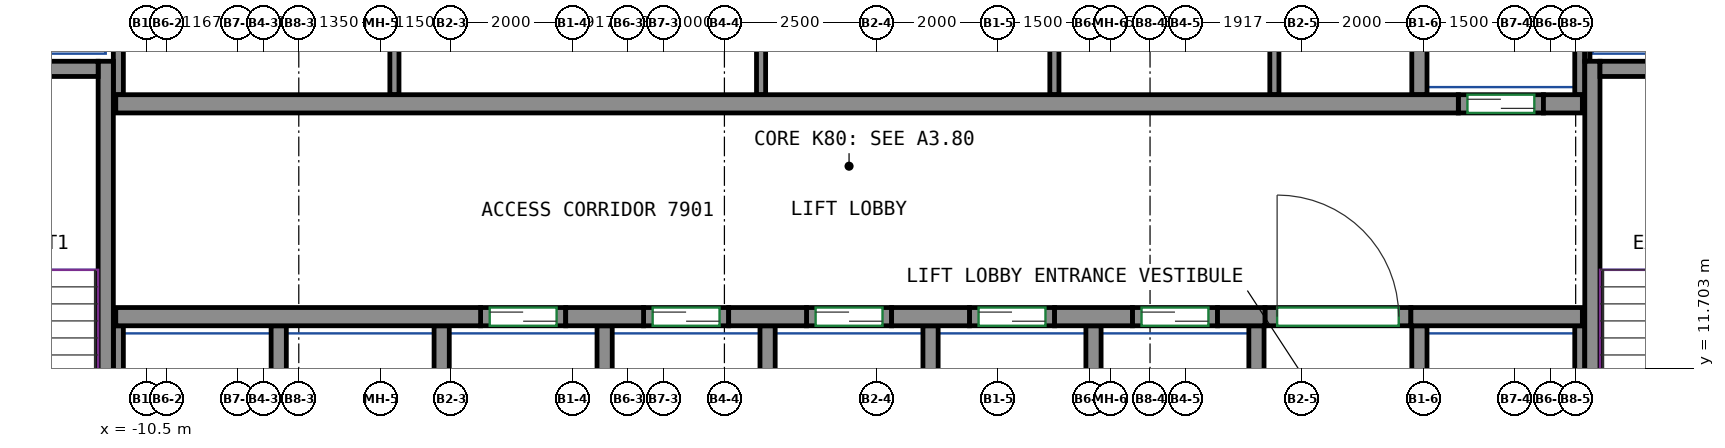
"""IFC4 building model, lengths in metres.
Left out: names, types, materials, properties, quantities, classifications, styles, units other than length and angle.
Written with IfcOpenShell. Run it as: python <this file> out.ifc"""

import sys

from ifc_helpers import new_model, si_unit, direction, frame, frame_2d, origin, place, context, subcontext, project, spatial, rectangle, extrude, source, transform, mapped, element, fill, save


model = new_model("IFC4")
c1 = context("Model", 3, precision=1e-05, world=origin(), true_north=direction((0.0, 1.0)))
c2 = subcontext(c1, "Body", "Model", "MODEL_VIEW")
j1 = project(units=[si_unit("LENGTHUNIT", "METRE"), si_unit("PLANEANGLEUNIT", "RADIAN")], contexts=[c1])
p1 = place(None, origin())
s1 = spatial("IfcSite", under=j1, at=p1, CompositionType="ELEMENT")
p2 = place(p1, origin())
s2 = spatial("IfcBuilding", under=s1, at=p2, CompositionType="ELEMENT")
p3 = place(p2, frame((0.0, 0.0, 315.4)))
s3 = spatial("IfcBuildingStorey", under=s2, at=p3, CompositionType="ELEMENT", Elevation=315.4)
m1 = source(origin(), c2, "Body", "SweptSolid", [
    extrude(rectangle(XDim=7.75, YDim=0.25, at=frame_2d((3.875, 0.0))), origin(), (0.0, 0.0, 1.0), 3.0),
])
p4 = place(p3, frame((-11.175, 9.0, 0.0), z_axis=(0.0, 0.0, 1.0), x_axis=(0.0, 1.0, 0.0)))
e1 = element("IfcWall", 1, at=p4, inside=s3, PredefinedType="SHEAR", context=c2, shape_type="MappedRepresentation", body=[
    mapped(m1, transform((0.0, 0.0, 0.0))),
])
m2 = source(origin(), c2, "Body", "SweptSolid", [
    extrude(rectangle(XDim=3.7, YDim=0.25, at=frame_2d((1.85, 0.0))), origin(), (0.0, 0.0, 1.0), 3.0),
])
p5 = place(p3, frame((-15.0, 16.625, 0.0), z_axis=(0.0, 0.0, 1.0), x_axis=(1.0, 0.0, 0.0)))
e2 = element("IfcWall", 2, at=p5, inside=s3, PredefinedType="SHEAR", context=c2, shape_type="MappedRepresentation", body=[
    mapped(m2, transform((0.0, 0.0, 0.0))),
])
p6 = place(p3, frame((13.275, 9.0, 0.0), z_axis=(0.0, 0.0, 1.0), x_axis=(0.0, 1.0, 0.0)))
e3 = element("IfcWall", 3, at=p6, inside=s3, PredefinedType="SHEAR", context=c2, shape_type="MappedRepresentation", body=[
    mapped(m1, transform((0.0, 0.0, 0.0))),
])
m3 = source(origin(), c2, "Body", "SweptSolid", [
    extrude(rectangle(XDim=3.7, YDim=0.25, at=frame_2d((1.85, 0.0))), origin(), (0.0, 0.0, 1.0), 3.0),
])
p7 = place(p3, frame((13.4, 16.625, 0.0), z_axis=(0.0, 0.0, 1.0), x_axis=(1.0, 0.0, 0.0)))
e4 = element("IfcWall", 4, at=p7, inside=s3, PredefinedType="SHEAR", context=c2, shape_type="MappedRepresentation", body=[
    mapped(m3, transform((0.0, 0.0, 0.0))),
])
m4 = source(origin(), c2, "Body", "SweptSolid", [
    extrude(rectangle(XDim=6.0, YDim=0.3, at=frame_2d((3.0, 0.0))), origin(), (0.0, 0.0, 1.0), 3.0),
])
p8 = place(p3, frame((-11.01, 12.55, 0.0), z_axis=(0.0, 0.0, 1.0), x_axis=(1.0, 0.0, 0.0)))
e5 = element("IfcWall", 5, at=p8, inside=s3, PredefinedType="SHEAR", context=c2, shape_type="MappedRepresentation", body=[
    mapped(m4, transform((0.0, 0.0, 0.0))),
])
m5 = source(origin(), c2, "Body", "SweptSolid", [
    extrude(rectangle(XDim=1.28, YDim=0.3, at=frame_2d((0.64, 0.0))), origin(), (0.0, 0.0, 1.0), 3.0),
])
for number, where, z_axis, x_axis in (
    (6, (-3.61, 12.55, 0.0), (0.0, 0.0, 1.0), (1.0, 0.0, 0.0)),
    (7, (-0.93, 12.55, 0.0), (0.0, 0.0, 1.0), (1.0, 0.0, 0.0)),
    (8, (1.75, 12.55, 0.0), (0.0, 0.0, 1.0), (1.0, 0.0, 0.0)),
    (9, (4.43, 12.55, 0.0), (0.0, 0.0, 1.0), (1.0, 0.0, 0.0)),
):
    element("IfcWall", number, at=place(p3, frame(where, z_axis=z_axis, x_axis=x_axis)), inside=s3, PredefinedType="SHEAR", context=c2, shape_type="MappedRepresentation", body=[
        mapped(m5, transform((0.0, 0.0, 0.0))),
    ])
m6 = source(origin(), c2, "Body", "SweptSolid", [
    extrude(rectangle(XDim=0.78, YDim=0.3, at=frame_2d((0.39, 0.0))), origin(), (0.0, 0.0, 1.0), 3.0),
])
p9 = place(p3, frame((7.11, 12.55, 0.0), z_axis=(0.0, 0.0, 1.0), x_axis=(1.0, 0.0, 0.0)))
e10 = element("IfcWall", 10, at=p9, inside=s3, PredefinedType="SHEAR", context=c2, shape_type="MappedRepresentation", body=[
    mapped(m6, transform((0.0, 0.0, 0.0))),
])
m7 = source(origin(), c2, "Body", "SweptSolid", [
    extrude(rectangle(XDim=2.82, YDim=0.3, at=frame_2d((1.41, 0.0))), origin(), (0.0, 0.0, 1.0), 3.0),
])
p10 = place(p3, frame((10.29, 12.55, 0.0), z_axis=(0.0, 0.0, 1.0), x_axis=(1.0, 0.0, 0.0)))
e11 = element("IfcWall", 11, at=p10, inside=s3, PredefinedType="SHEAR", context=c2, shape_type="MappedRepresentation", body=[
    mapped(m7, transform((0.0, 0.0, 0.0))),
])
m8 = source(origin(), c2, "Body", "SweptSolid", [
    extrude(rectangle(XDim=22.08, YDim=0.3, at=frame_2d((11.04, 0.0))), origin(), (0.0, 0.0, 1.0), 3.0),
])
p11 = place(p3, frame((-11.01, 16.05, 0.0), z_axis=(0.0, 0.0, 1.0), x_axis=(1.0, 0.0, 0.0)))
e12 = element("IfcWall", 12, at=p11, inside=s3, PredefinedType="SHEAR", context=c2, shape_type="MappedRepresentation", body=[
    mapped(m8, transform((0.0, 0.0, 0.0))),
])
m9 = source(origin(), c2, "Body", "SweptSolid", [
    extrude(rectangle(XDim=0.64, YDim=0.3, at=frame_2d((0.32, 0.0))), origin(), (0.0, 0.0, 1.0), 3.0),
])
p12 = place(p3, frame((12.47, 16.05, 0.0), z_axis=(0.0, 0.0, 1.0), x_axis=(1.0, 0.0, 0.0)))
e13 = element("IfcWall", 13, at=p12, inside=s3, PredefinedType="SHEAR", context=c2, shape_type="MappedRepresentation", body=[
    mapped(m9, transform((0.0, 0.0, 0.0))),
])
m10 = source(origin(), c2, "Body", "SweptSolid", [
    extrude(rectangle(XDim=1.4, YDim=0.3, at=frame_2d((0.7, 0.0))), origin(), (0.0, 0.0, 1.0), 3.0),
])
p13 = place(p3, frame((-5.01, 12.55, 0.0), z_axis=(0.0, 0.0, 1.0), x_axis=(1.0, 0.0, 0.0)))
e14 = element("IfcWall", 14, at=p13, inside=s3, PredefinedType="PARTITIONING", context=c2, shape_type="MappedRepresentation", body=[
    mapped(m10, transform((0.0, 0.0, 0.0))),
])
p14 = place(p13, frame((0.15, 0.0, 0.0)))
e15 = element("IfcOpeningElement", 15, at=p14, cuts=e14, PredefinedType="OPENING", context=c2, shape_type="SweptSolid", body=[
    extrude(rectangle(XDim=1.1, YDim=2.1, at=frame_2d((0.55, 1.05))), frame((0.0, 0.16, 0.0), z_axis=(0.0, -1.0, 0.0), x_axis=(1.0, 0.0, 0.0)), (0.0, 0.0, 1.0), 0.32),
])
m11 = source(origin(), c2, "Body", "SweptSolid", [
    extrude(rectangle(XDim=1.4, YDim=0.3, at=frame_2d((0.7, 0.0))), origin(), (0.0, 0.0, 1.0), 3.0),
])
p15 = place(p3, frame((-2.33, 12.55, 0.0), z_axis=(0.0, 0.0, 1.0), x_axis=(1.0, 0.0, 0.0)))
e16 = element("IfcWall", 16, at=p15, inside=s3, PredefinedType="PARTITIONING", context=c2, shape_type="MappedRepresentation", body=[
    mapped(m11, transform((0.0, 0.0, 0.0))),
])
p16 = place(p15, frame((0.15, 0.0, 0.0)))
e17 = element("IfcOpeningElement", 17, at=p16, cuts=e16, PredefinedType="OPENING", context=c2, shape_type="SweptSolid", body=[
    extrude(rectangle(XDim=1.1, YDim=2.1, at=frame_2d((0.55, 1.05))), frame((0.0, 0.16, 0.0), z_axis=(0.0, -1.0, 0.0), x_axis=(1.0, 0.0, 0.0)), (0.0, 0.0, 1.0), 0.32),
])
p17 = place(p3, frame((0.35, 12.55, 0.0), z_axis=(0.0, 0.0, 1.0), x_axis=(1.0, 0.0, 0.0)))
e18 = element("IfcWall", 18, at=p17, inside=s3, PredefinedType="PARTITIONING", context=c2, shape_type="MappedRepresentation", body=[
    mapped(m10, transform((0.0, 0.0, 0.0))),
])
p18 = place(p17, frame((0.15, 0.0, 0.0)))
e19 = element("IfcOpeningElement", 19, at=p18, cuts=e18, PredefinedType="OPENING", context=c2, shape_type="SweptSolid", body=[
    extrude(rectangle(XDim=1.1, YDim=2.1, at=frame_2d((0.55, 1.05))), frame((0.0, 0.16, 0.0), z_axis=(0.0, -1.0, 0.0), x_axis=(1.0, 0.0, 0.0)), (0.0, 0.0, 1.0), 0.32),
])
p19 = place(p3, frame((3.03, 12.55, 0.0), z_axis=(0.0, 0.0, 1.0), x_axis=(1.0, 0.0, 0.0)))
e20 = element("IfcWall", 20, at=p19, inside=s3, PredefinedType="PARTITIONING", context=c2, shape_type="MappedRepresentation", body=[
    mapped(m10, transform((0.0, 0.0, 0.0))),
])
p20 = place(p19, frame((0.15, 0.0, 0.0)))
e21 = element("IfcOpeningElement", 21, at=p20, cuts=e20, PredefinedType="OPENING", context=c2, shape_type="SweptSolid", body=[
    extrude(rectangle(XDim=1.1, YDim=2.1, at=frame_2d((0.55, 1.05))), frame((0.0, 0.16, 0.0), z_axis=(0.0, -1.0, 0.0), x_axis=(1.0, 0.0, 0.0)), (0.0, 0.0, 1.0), 0.32),
])
p21 = place(p3, frame((5.71, 12.55, 0.0), z_axis=(0.0, 0.0, 1.0), x_axis=(1.0, 0.0, 0.0)))
e22 = element("IfcWall", 22, at=p21, inside=s3, PredefinedType="PARTITIONING", context=c2, shape_type="MappedRepresentation", body=[
    mapped(m11, transform((0.0, 0.0, 0.0))),
])
p22 = place(p21, frame((0.15, 0.0, 0.0)))
e23 = element("IfcOpeningElement", 23, at=p22, cuts=e22, PredefinedType="OPENING", context=c2, shape_type="SweptSolid", body=[
    extrude(rectangle(XDim=1.1, YDim=2.1, at=frame_2d((0.55, 1.05))), frame((0.0, 0.16, 0.0), z_axis=(0.0, -1.0, 0.0), x_axis=(1.0, 0.0, 0.0)), (0.0, 0.0, 1.0), 0.32),
])
m12 = source(origin(), c2, "Body", "SweptSolid", [
    extrude(rectangle(XDim=1.4, YDim=0.3, at=frame_2d((0.7, 0.0))), origin(), (0.0, 0.0, 1.0), 2.4),
])
p23 = place(p3, frame((11.07, 16.05, 0.0), z_axis=(0.0, 0.0, 1.0), x_axis=(1.0, 0.0, 0.0)))
e24 = element("IfcWall", 24, at=p23, inside=s3, PredefinedType="PARTITIONING", context=c2, shape_type="MappedRepresentation", body=[
    mapped(m12, transform((0.0, 0.0, 0.0))),
])
p24 = place(p23, frame((0.15, 0.0, 0.0)))
e25 = element("IfcOpeningElement", 25, at=p24, cuts=e24, PredefinedType="OPENING", context=c2, shape_type="SweptSolid", body=[
    extrude(rectangle(XDim=1.1, YDim=2.1, at=frame_2d((0.55, 1.05))), frame((0.0, 0.16, 0.0), z_axis=(0.0, -1.0, 0.0), x_axis=(1.0, 0.0, 0.0)), (0.0, 0.0, 1.0), 0.32),
])
m13 = source(origin(), c2, "Body", "SweptSolid", [
    extrude(rectangle(XDim=2.4, YDim=0.3, at=frame_2d((1.2, 0.0))), origin(), (0.0, 0.0, 1.0), 3.0),
])
p25 = place(p3, frame((7.89, 12.55, 0.0), z_axis=(0.0, 0.0, 1.0), x_axis=(1.0, 0.0, 0.0)))
e26 = element("IfcWall", 26, at=p25, inside=s3, PredefinedType="PARTITIONING", context=c2, shape_type="MappedRepresentation", body=[
    mapped(m13, transform((0.0, 0.0, 0.0))),
])
p26 = place(p25, frame((0.2, 0.0, 0.0)))
e27 = element("IfcOpeningElement", 27, at=p26, cuts=e26, PredefinedType="OPENING", context=c2, shape_type="SweptSolid", body=[
    extrude(rectangle(XDim=2.0, YDim=2.1, at=frame_2d((1.0, 1.05))), frame((0.0, 0.16, 0.0), z_axis=(0.0, -1.0, 0.0), x_axis=(1.0, 0.0, 0.0)), (0.0, 0.0, 1.0), 0.32),
])
m14 = source(origin(), c2, "Body", "SweptSolid", [
    extrude(rectangle(XDim=3.275, YDim=0.165, at=frame_2d((1.638, 0.0))), origin(), (0.0, 0.0, 1.0), 3.0),
])
p27 = place(p3, frame((13.067, 16.2, 0.0), z_axis=(0.0, 0.0, 1.0), x_axis=(0.0, 1.0, 0.0)))
e28 = element("IfcWall", 28, at=p27, inside=s3, PredefinedType="PARTITIONING", context=c2, shape_type="MappedRepresentation", body=[
    mapped(m14, transform((0.0, 0.0, 0.0))),
])
m15 = source(origin(), c2, "Body", "SweptSolid", [
    extrude(rectangle(XDim=4.8, YDim=0.165, at=frame_2d((2.4, 0.0))), origin(), (0.0, 0.0, 1.0), 3.0),
])
p28 = place(p3, frame((-10.968, 16.2, 0.0), z_axis=(0.0, 0.0, 1.0), x_axis=(0.0, 1.0, 0.0)))
e29 = element("IfcWall", 29, at=p28, inside=s3, PredefinedType="PARTITIONING", context=c2, shape_type="MappedRepresentation", body=[
    mapped(m15, transform((0.0, 0.0, 0.0))),
])
m16 = source(origin(), c2, "Body", "SweptSolid", [
    extrude(rectangle(XDim=3.275, YDim=0.25, at=frame_2d((1.638, 0.0))), origin(), (0.0, 0.0, 1.0), 3.0),
])
p29 = place(p3, frame((10.43, 16.2, 0.0), z_axis=(0.0, 0.0, 1.0), x_axis=(0.0, 1.0, 0.0)))
e30 = element("IfcWall", 30, at=p29, inside=s3, PredefinedType="PARTITIONING", context=c2, shape_type="MappedRepresentation", body=[
    mapped(m16, transform((0.0, 0.0, 0.0))),
])
m17 = source(origin(), c2, "Body", "SweptSolid", [
    extrude(rectangle(XDim=2.725, YDim=0.085, at=frame_2d((1.363, 0.0))), origin(), (0.0, 0.0, 1.0), 3.0),
])
p30 = place(p3, frame((13.192, 16.75, 0.0), z_axis=(0.0, 0.0, 1.0), x_axis=(0.0, 1.0, 0.0)))
e31 = element("IfcWall", 31, at=p30, inside=s3, PredefinedType="PARTITIONING", context=c2, shape_type="MappedRepresentation", body=[
    mapped(m17, transform((0.0, 0.0, 0.0))),
])
m18 = source(origin(), c2, "Body", "SweptSolid", [
    extrude(rectangle(XDim=3.4, YDim=0.25, at=frame_2d((1.7, 0.0))), origin(), (0.0, 0.0, 1.0), 3.0),
])
p31 = place(p3, frame((10.43, 9.0, 0.0), z_axis=(0.0, 0.0, 1.0), x_axis=(0.0, 1.0, 0.0)))
e32 = element("IfcWall", 32, at=p31, inside=s3, PredefinedType="PARTITIONING", context=c2, shape_type="MappedRepresentation", body=[
    mapped(m18, transform((0.0, 0.0, 0.0))),
])
m19 = source(origin(), c2, "Body", "SweptSolid", [
    extrude(rectangle(XDim=3.4, YDim=0.165, at=frame_2d((1.7, 0.0))), origin(), (0.0, 0.0, 1.0), 3.0),
])
p32 = place(p3, frame((13.067, 9.0, 0.0), z_axis=(0.0, 0.0, 1.0), x_axis=(0.0, 1.0, 0.0)))
e33 = element("IfcWall", 33, at=p32, inside=s3, PredefinedType="PARTITIONING", context=c2, shape_type="MappedRepresentation", body=[
    mapped(m19, transform((0.0, 0.0, 0.0))),
])
for number, where, z_axis, x_axis in (
    (34, (2.39, 9.0, 0.0), (0.0, 0.0, 1.0), (0.0, 1.0, 0.0)),
    (35, (5.07, 9.0, 0.0), (0.0, 0.0, 1.0), (0.0, 1.0, 0.0)),
    (36, (7.75, 9.0, 0.0), (0.0, 0.0, 1.0), (0.0, 1.0, 0.0)),
    (37, (-0.29, 9.0, 0.0), (0.0, 0.0, 1.0), (0.0, 1.0, 0.0)),
):
    element("IfcWall", number, at=place(p3, frame(where, z_axis=z_axis, x_axis=x_axis)), inside=s3, PredefinedType="PARTITIONING", context=c2, shape_type="MappedRepresentation", body=[
        mapped(m18, transform((0.0, 0.0, 0.0))),
    ])
p33 = place(p3, frame((-10.968, 9.0, 0.0), z_axis=(0.0, 0.0, 1.0), x_axis=(0.0, 1.0, 0.0)))
e38 = element("IfcWall", 38, at=p33, inside=s3, PredefinedType="PARTITIONING", context=c2, shape_type="MappedRepresentation", body=[
    mapped(m19, transform((0.0, 0.0, 0.0))),
])
for number, where, z_axis, x_axis in (
    (39, (-2.97, 9.0, 0.0), (0.0, 0.0, 1.0), (0.0, 1.0, 0.0)),
    (40, (-5.65, 9.0, 0.0), (0.0, 0.0, 1.0), (0.0, 1.0, 0.0)),
    (41, (-8.33, 9.0, 0.0), (0.0, 0.0, 1.0), (0.0, 1.0, 0.0)),
):
    element("IfcWall", number, at=place(p3, frame(where, z_axis=z_axis, x_axis=x_axis)), inside=s3, PredefinedType="PARTITIONING", context=c2, shape_type="MappedRepresentation", body=[
        mapped(m18, transform((0.0, 0.0, 0.0))),
    ])
m20 = source(origin(), c2, "Body", "SweptSolid", [
    extrude(rectangle(XDim=4.8, YDim=0.15, at=frame_2d((2.4, 0.0))), origin(), (0.0, 0.0, 1.0), 3.0),
])
for number, where, z_axis, x_axis in (
    (42, (-6.427, 16.2, 0.0), (0.0, 0.0, 1.0), (0.0, 1.0, 0.0)),
    (43, (-0.397, 16.2, 0.0), (0.0, 0.0, 1.0), (0.0, 1.0, 0.0)),
    (44, (4.427, 16.2, 0.0), (0.0, 0.0, 1.0), (0.0, 1.0, 0.0)),
    (45, (8.045, 16.2, 0.0), (0.0, 0.0, 1.0), (0.0, 1.0, 0.0)),
):
    element("IfcWall", number, at=place(p3, frame(where, z_axis=z_axis, x_axis=x_axis)), inside=s3, PredefinedType="PARTITIONING", context=c2, shape_type="MappedRepresentation", body=[
        mapped(m20, transform((0.0, 0.0, 0.0))),
    ])
p34 = place(p26, origin())
e46 = element("IfcDoor", 46, at=p34, inside=s3, OperationType="DOUBLE_DOOR_SINGLE_SWING", PredefinedType="DOOR", context=c2, shape_type="SweptSolid", body=[
    extrude(rectangle(XDim=2.0, YDim=2.1, at=frame_2d((1.0, 1.05))), frame((0.0, 0.025, 0.0), z_axis=(0.0, -1.0, 0.0), x_axis=(1.0, 0.0, 0.0)), (0.0, 0.0, 1.0), 0.05),
])
fill(e27, e46)
p35 = place(p14, origin())
e47 = element("IfcDoor", 47, at=p35, inside=s3, OperationType="DOUBLE_DOOR_SLIDING", PredefinedType="DOOR", context=c2, shape_type="SweptSolid", body=[
    extrude(rectangle(XDim=1.1, YDim=2.1, at=frame_2d((0.55, 1.05))), frame((0.0, 0.025, 0.0), z_axis=(0.0, -1.0, 0.0), x_axis=(1.0, 0.0, 0.0)), (0.0, 0.0, 1.0), 0.05),
])
fill(e15, e47)
p36 = place(p16, origin())
e48 = element("IfcDoor", 48, at=p36, inside=s3, OperationType="DOUBLE_DOOR_SLIDING", PredefinedType="DOOR", context=c2, shape_type="SweptSolid", body=[
    extrude(rectangle(XDim=1.1, YDim=2.1, at=frame_2d((0.55, 1.05))), frame((0.0, 0.025, 0.0), z_axis=(0.0, -1.0, 0.0), x_axis=(1.0, 0.0, 0.0)), (0.0, 0.0, 1.0), 0.05),
])
fill(e17, e48)
p37 = place(p18, origin())
e49 = element("IfcDoor", 49, at=p37, inside=s3, OperationType="DOUBLE_DOOR_SLIDING", PredefinedType="DOOR", context=c2, shape_type="SweptSolid", body=[
    extrude(rectangle(XDim=1.1, YDim=2.1, at=frame_2d((0.55, 1.05))), frame((0.0, 0.025, 0.0), z_axis=(0.0, -1.0, 0.0), x_axis=(1.0, 0.0, 0.0)), (0.0, 0.0, 1.0), 0.05),
])
fill(e19, e49)
p38 = place(p20, origin())
e50 = element("IfcDoor", 50, at=p38, inside=s3, OperationType="DOUBLE_DOOR_SLIDING", PredefinedType="DOOR", context=c2, shape_type="SweptSolid", body=[
    extrude(rectangle(XDim=1.1, YDim=2.1, at=frame_2d((0.55, 1.05))), frame((0.0, 0.025, 0.0), z_axis=(0.0, -1.0, 0.0), x_axis=(1.0, 0.0, 0.0)), (0.0, 0.0, 1.0), 0.05),
])
fill(e21, e50)
p39 = place(p22, origin())
e51 = element("IfcDoor", 51, at=p39, inside=s3, OperationType="DOUBLE_DOOR_SLIDING", PredefinedType="DOOR", context=c2, shape_type="SweptSolid", body=[
    extrude(rectangle(XDim=1.1, YDim=2.1, at=frame_2d((0.55, 1.05))), frame((0.0, 0.025, 0.0), z_axis=(0.0, -1.0, 0.0), x_axis=(1.0, 0.0, 0.0)), (0.0, 0.0, 1.0), 0.05),
])
fill(e23, e51)
p40 = place(p24, origin())
e52 = element("IfcDoor", 52, at=p40, inside=s3, OperationType="DOUBLE_DOOR_SLIDING", PredefinedType="DOOR", context=c2, shape_type="SweptSolid", body=[
    extrude(rectangle(XDim=1.1, YDim=2.1, at=frame_2d((0.55, 1.05))), frame((0.0, 0.025, 0.0), z_axis=(0.0, -1.0, 0.0), x_axis=(1.0, 0.0, 0.0)), (0.0, 0.0, 1.0), 0.05),
])
fill(e25, e52)
save(model, sys.argv[1])
